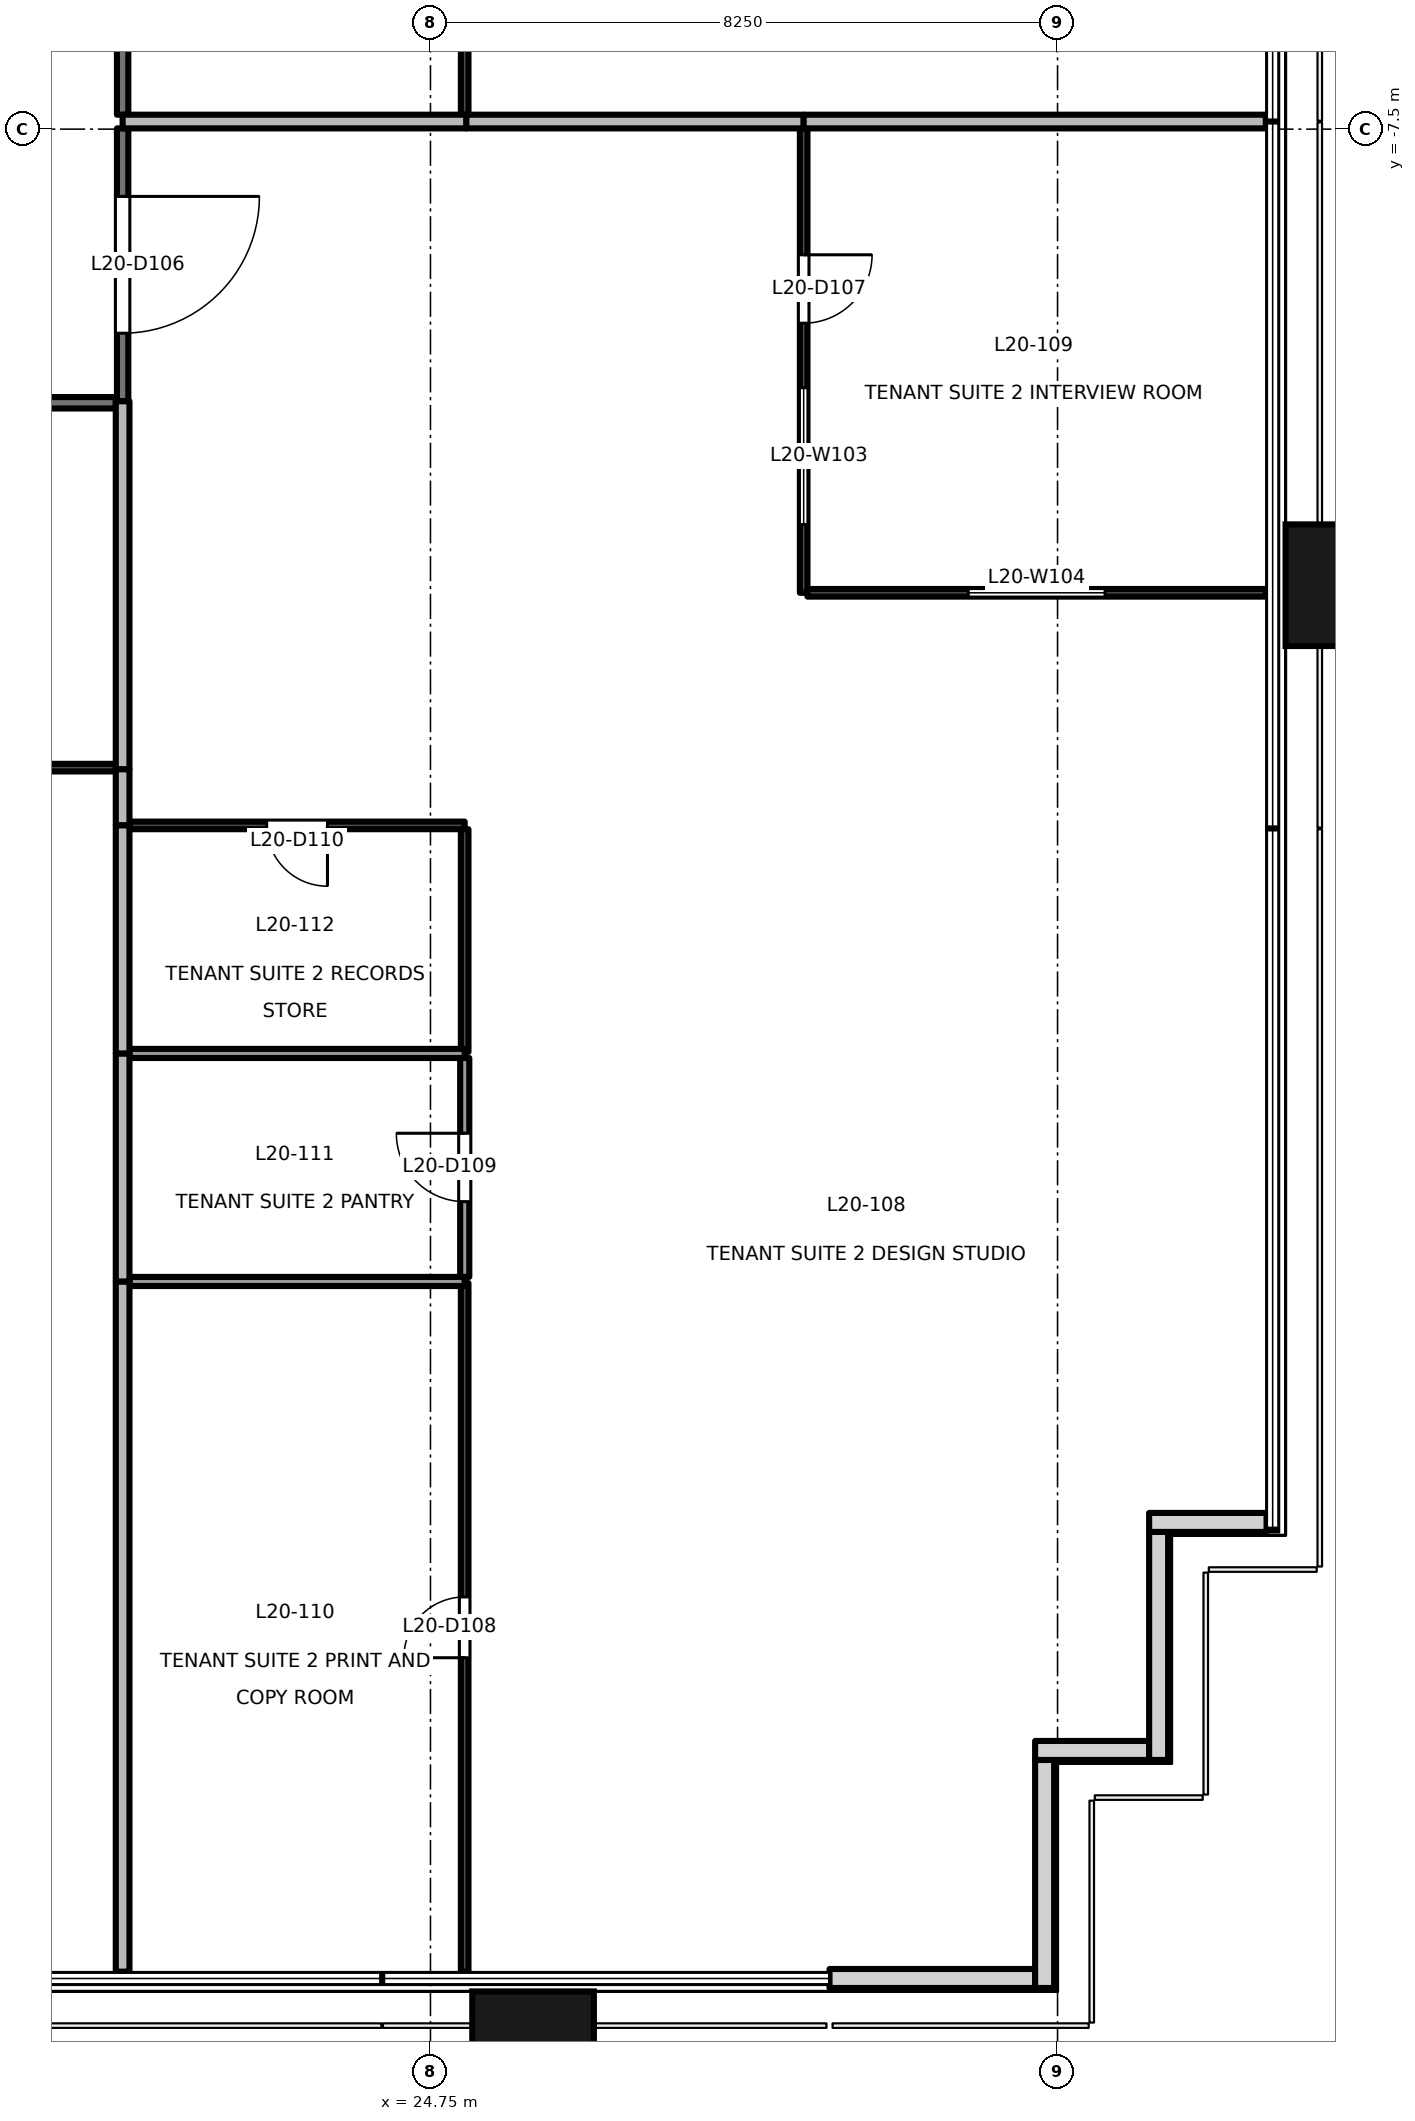
"""IFC4 building model, lengths in metres.
Left out: names, types, materials, properties, quantities, classifications, styles, units other than length and angle.
Written with IfcOpenShell. Run it as: python <this file> out.ifc"""

import sys

from ifc_helpers import new_model, si_unit, direction, frame, frame_2d, origin, origin_2d, place, context, subcontext, project, spatial, rectangle, extrude, element, fill, save


model = new_model("IFC4")
c1 = context("Model", 3, precision=1e-05, world=origin(), true_north=direction((0.0, 1.0)))
c2 = subcontext(c1, "Body", "Model", "MODEL_VIEW")
j1 = project(units=[si_unit("LENGTHUNIT", "METRE"), si_unit("PLANEANGLEUNIT", "RADIAN")], contexts=[c1])
p1 = place(None, origin())
s1 = spatial("IfcSite", under=j1, at=p1, CompositionType="ELEMENT")
p2 = place(p1, origin())
s2 = spatial("IfcBuilding", under=s1, at=p2, CompositionType="ELEMENT")
p3 = place(p2, frame((0.0, 0.0, 91.7)))
s3 = spatial("IfcBuildingStorey", under=s2, at=p3, CompositionType="ELEMENT", Elevation=91.7)
for number, where, z_axis, x_axis in (
    (1, (26.1, -32.9, -0.2), (0.0, 0.0, 1.0), (1.0, 0.0, 0.0)),
    (2, (36.9, -13.5, -0.2), (0.0, 0.0, 1.0), (0.0, 1.0, 0.0)),
):
    element("IfcColumn", number, at=place(p3, frame(where, z_axis=z_axis, x_axis=x_axis)), inside=s3, PredefinedType="COLUMN", context=c2, shape_type="SweptSolid", body=[
        extrude(rectangle(XDim=1.6, YDim=1.8, at=origin_2d()), origin(), (0.0, 0.0, 1.0), 4.0),
    ])
p4 = place(p3, frame((30.0, -31.83, 0.0), z_axis=(0.0, 0.0, 1.0), x_axis=(1.0, 0.0, 0.0)))
e3 = element("IfcWall", 3, at=p4, inside=s3, PredefinedType="SOLIDWALL", context=c2, shape_type="SweptSolid", body=[
    extrude(rectangle(XDim=2.705, YDim=0.25, at=frame_2d((1.353, 0.0))), origin(), (0.0, 0.0, 1.0), 3.8),
])
p5 = place(p3, frame((32.83, -31.955, 0.0), z_axis=(0.0, 0.0, 1.0), x_axis=(0.0, 1.0, 0.0)))
e4 = element("IfcWall", 4, at=p5, inside=s3, PredefinedType="SOLIDWALL", context=c2, shape_type="SweptSolid", body=[
    extrude(rectangle(XDim=3.0, YDim=0.25, at=frame_2d((1.5, 0.0))), origin(), (0.0, 0.0, 1.0), 3.8),
])
p6 = place(p3, frame((32.705, -28.83, 0.0), z_axis=(0.0, 0.0, 1.0), x_axis=(1.0, 0.0, 0.0)))
e5 = element("IfcWall", 5, at=p6, inside=s3, PredefinedType="SOLIDWALL", context=c2, shape_type="SweptSolid", body=[
    extrude(rectangle(XDim=1.5, YDim=0.25, at=frame_2d((0.75, 0.0))), origin(), (0.0, 0.0, 1.0), 3.8),
])
p7 = place(p3, frame((34.33, -28.955, 0.0), z_axis=(0.0, 0.0, 1.0), x_axis=(0.0, 1.0, 0.0)))
e6 = element("IfcWall", 6, at=p7, inside=s3, PredefinedType="SOLIDWALL", context=c2, shape_type="SweptSolid", body=[
    extrude(rectangle(XDim=3.0, YDim=0.25, at=frame_2d((1.5, 0.0))), origin(), (0.0, 0.0, 1.0), 3.8),
])
p8 = place(p3, frame((34.205, -25.83, 0.0), z_axis=(0.0, 0.0, 1.0), x_axis=(1.0, 0.0, 0.0)))
e7 = element("IfcWall", 7, at=p8, inside=s3, PredefinedType="SOLIDWALL", context=c2, shape_type="SweptSolid", body=[
    extrude(rectangle(XDim=1.545, YDim=0.25, at=frame_2d((0.772, 0.0))), origin(), (0.0, 0.0, 1.0), 3.8),
])
p9 = place(p3, frame((20.7, -7.49, 0.0), z_axis=(0.0, 0.0, 1.0), x_axis=(0.0, -1.0, 0.0)))
e8 = element("IfcWall", 8, at=p9, inside=s3, PredefinedType="PARTITIONING", context=c2, shape_type="SweptSolid", body=[
    extrude(rectangle(XDim=3.59, YDim=0.15, at=frame_2d((1.795, 0.0))), origin(), (0.0, 0.0, 1.0), 2.9),
])
p10 = place(p9, frame((0.895, 0.0, 0.0)))
e9 = element("IfcOpeningElement", 9, at=p10, cuts=e8, PredefinedType="OPENING", context=c2, shape_type="SweptSolid", body=[
    extrude(rectangle(XDim=1.8, YDim=2.1, at=frame_2d((0.9, 1.05))), frame((0.0, 0.085, 0.0), z_axis=(0.0, -1.0, 0.0), x_axis=(1.0, 0.0, 0.0)), (0.0, 0.0, 1.0), 0.171),
])
p11 = place(p3, frame((20.7, -3.82, 0.0), z_axis=(0.0, 0.0, 1.0), x_axis=(0.0, -1.0, 0.0)))
e10 = element("IfcWall", 10, at=p11, inside=s3, PredefinedType="PARTITIONING", context=c2, shape_type="SweptSolid", body=[
    extrude(rectangle(XDim=3.49, YDim=0.15, at=frame_2d((1.745, 0.0))), origin(), (0.0, 0.0, 1.0), 2.9),
])
p12 = place(p3, frame((20.61, -11.1, 0.0), z_axis=(0.0, 0.0, 1.0), x_axis=(-1.0, 0.0, 0.0)))
e11 = element("IfcWall", 11, at=p12, inside=s3, PredefinedType="PARTITIONING", context=c2, shape_type="SweptSolid", body=[
    extrude(rectangle(XDim=8.63, YDim=0.15, at=frame_2d((4.315, 0.0))), origin(), (0.0, 0.0, 1.0), 2.4),
])
p13 = place(p3, frame((29.66, -7.49, 0.0), z_axis=(0.0, 0.0, 1.0), x_axis=(0.0, -1.0, 0.0)))
e12 = element("IfcWall", 12, at=p13, inside=s3, PredefinedType="PARTITIONING", context=c2, shape_type="SweptSolid", body=[
    extrude(rectangle(XDim=6.11, YDim=0.1, at=frame_2d((3.055, 0.0))), origin(), (0.0, 0.0, 1.0), 2.9),
])
p14 = place(p13, frame((1.663, 0.0, 0.0)))
e13 = element("IfcOpeningElement", 13, at=p14, cuts=e12, PredefinedType="OPENING", context=c2, shape_type="SweptSolid", body=[
    extrude(rectangle(XDim=0.9, YDim=2.1, at=frame_2d((0.45, 1.05))), frame((0.0, 0.061, 0.0), z_axis=(0.0, -1.0, 0.0), x_axis=(1.0, 0.0, 0.0)), (0.0, 0.0, 1.0), 0.121),
])
p15 = place(p13, frame((3.412, 0.0, 0.9)))
e14 = element("IfcOpeningElement", 14, at=p15, cuts=e12, PredefinedType="OPENING", context=c2, shape_type="SweptSolid", body=[
    extrude(rectangle(XDim=1.8, YDim=1.2, at=frame_2d((0.9, 0.6))), frame((0.0, 0.061, 0.0), z_axis=(0.0, -1.0, 0.0), x_axis=(1.0, 0.0, 0.0)), (0.0, 0.0, 1.0), 0.121),
])
p16 = place(p3, frame((29.71, -13.6, 0.0), z_axis=(0.0, 0.0, 1.0), x_axis=(1.0, 0.0, 0.0)))
e15 = element("IfcWall", 15, at=p16, inside=s3, PredefinedType="PARTITIONING", context=c2, shape_type="SweptSolid", body=[
    extrude(rectangle(XDim=6.03, YDim=0.1, at=frame_2d((3.015, 0.0))), origin(), (0.0, 0.0, 1.0), 2.9),
])
p17 = place(p16, frame((2.115, 0.0, 0.9)))
e16 = element("IfcOpeningElement", 16, at=p17, cuts=e15, PredefinedType="OPENING", context=c2, shape_type="SweptSolid", body=[
    extrude(rectangle(XDim=1.8, YDim=1.2, at=frame_2d((0.9, 0.6))), frame((0.0, 0.061, 0.0), z_axis=(0.0, -1.0, 0.0), x_axis=(1.0, 0.0, 0.0)), (0.0, 0.0, 1.0), 0.121),
])
p18 = place(p3, frame((25.2, -31.74, 0.0), z_axis=(0.0, 0.0, 1.0), x_axis=(0.0, 1.0, 0.0)))
e17 = element("IfcWall", 17, at=p18, inside=s3, PredefinedType="PARTITIONING", context=c2, shape_type="SweptSolid", body=[
    extrude(rectangle(XDim=9.06, YDim=0.1, at=frame_2d((4.53, 0.0))), origin(), (0.0, 0.0, 1.0), 3.8),
])
p19 = place(p18, frame((4.13, 0.0, 0.0)))
e18 = element("IfcOpeningElement", 18, at=p19, cuts=e17, PredefinedType="OPENING", context=c2, shape_type="SweptSolid", body=[
    extrude(rectangle(XDim=0.8, YDim=2.1, at=frame_2d((0.4, 1.05))), frame((0.0, 0.061, 0.0), z_axis=(0.0, -1.0, 0.0), x_axis=(1.0, 0.0, 0.0)), (0.0, 0.0, 1.0), 0.121),
])
p20 = place(p3, frame((25.201, -22.6, 0.0), z_axis=(0.0, 0.0, 1.0), x_axis=(0.0, 1.0, 0.0)))
e19 = element("IfcWall", 19, at=p20, inside=s3, PredefinedType="PARTITIONING", context=c2, shape_type="SweptSolid", body=[
    extrude(rectangle(XDim=2.88, YDim=0.12, at=frame_2d((1.44, 0.0))), origin(), (0.0, 0.0, 1.0), 3.8),
])
p21 = place(p20, frame((0.99, 0.0, 0.0)))
e20 = element("IfcOpeningElement", 20, at=p21, cuts=e19, PredefinedType="OPENING", context=c2, shape_type="SweptSolid", body=[
    extrude(rectangle(XDim=0.9, YDim=2.1, at=frame_2d((0.45, 1.05))), frame((0.0, 0.071, 0.0), z_axis=(0.0, -1.0, 0.0), x_axis=(1.0, 0.0, 0.0)), (0.0, 0.0, 1.0), 0.141),
])
p22 = place(p3, frame((25.2, -16.66, 0.0), z_axis=(0.0, 0.0, 1.0), x_axis=(-1.0, 0.0, 0.0)))
e21 = element("IfcWall", 21, at=p22, inside=s3, PredefinedType="PARTITIONING", context=c2, shape_type="SweptSolid", body=[
    extrude(rectangle(XDim=4.41, YDim=0.1, at=frame_2d((2.205, 0.0))), origin(), (0.0, 0.0, 1.0), 3.8),
])
p23 = place(p22, frame((1.805, 0.0, 0.0)))
e22 = element("IfcOpeningElement", 22, at=p23, cuts=e21, PredefinedType="OPENING", context=c2, shape_type="SweptSolid", body=[
    extrude(rectangle(XDim=0.8, YDim=2.1, at=frame_2d((0.4, 1.05))), frame((0.0, 0.061, 0.0), z_axis=(0.0, -1.0, 0.0), x_axis=(1.0, 0.0, 0.0)), (0.0, 0.0, 1.0), 0.121),
])
p24 = place(p3, frame((25.2, -19.64, 0.0), z_axis=(0.0, 0.0, 1.0), x_axis=(0.0, 1.0, 0.0)))
e23 = element("IfcWall", 23, at=p24, inside=s3, PredefinedType="PARTITIONING", context=c2, shape_type="SweptSolid", body=[
    extrude(rectangle(XDim=2.93, YDim=0.1, at=frame_2d((1.465, 0.0))), origin(), (0.0, 0.0, 1.0), 3.8),
])
p25 = place(p3, frame((25.22, -7.4, 0.0), z_axis=(0.0, 0.0, 1.0), x_axis=(1.0, 0.0, 0.0)))
e24 = element("IfcWall", 24, at=p25, inside=s3, PredefinedType="PARTITIONING", context=c2, shape_type="SweptSolid", body=[
    extrude(rectangle(XDim=4.44, YDim=0.18, at=frame_2d((2.22, 0.0))), origin(), (0.0, 0.0, 1.0), 3.8),
])
p26 = place(p3, frame((20.7, -7.4, 0.0), z_axis=(0.0, 0.0, 1.0), x_axis=(1.0, 0.0, 0.0)))
e25 = element("IfcWall", 25, at=p26, inside=s3, PredefinedType="PARTITIONING", context=c2, shape_type="SweptSolid", body=[
    extrude(rectangle(XDim=4.52, YDim=0.18, at=frame_2d((2.26, 0.0))), origin(), (0.0, 0.0, 1.0), 3.8),
])
p27 = place(p3, frame((20.7, -16.66, 0.0), z_axis=(0.0, 0.0, 1.0), x_axis=(0.0, 1.0, 0.0)))
e26 = element("IfcWall", 26, at=p27, inside=s3, PredefinedType="PARTITIONING", context=c2, shape_type="SweptSolid", body=[
    extrude(rectangle(XDim=0.74, YDim=0.18, at=frame_2d((0.37, 0.0))), origin(), (0.0, 0.0, 1.0), 3.8),
])
p28 = place(p3, frame((20.7, -15.92, 0.0), z_axis=(0.0, 0.0, 1.0), x_axis=(0.0, 1.0, 0.0)))
e27 = element("IfcWall", 27, at=p28, inside=s3, PredefinedType="PARTITIONING", context=c2, shape_type="SweptSolid", body=[
    extrude(rectangle(XDim=4.84, YDim=0.18, at=frame_2d((2.42, 0.0))), origin(), (0.0, 0.0, 1.0), 2.9),
])
p29 = place(p3, frame((29.66, -7.4, 0.0), z_axis=(0.0, 0.0, 1.0), x_axis=(1.0, 0.0, 0.0)))
e28 = element("IfcWall", 28, at=p29, inside=s3, PredefinedType="PARTITIONING", context=c2, shape_type="SweptSolid", body=[
    extrude(rectangle(XDim=6.08, YDim=0.18, at=frame_2d((3.04, 0.0))), origin(), (0.0, 0.0, 1.0), 3.8),
])
p30 = place(p3, frame((20.79, -22.66, 0.0), z_axis=(0.0, 0.0, 1.0), x_axis=(1.0, 0.0, 0.0)))
e29 = element("IfcWall", 29, at=p30, inside=s3, PredefinedType="PARTITIONING", context=c2, shape_type="SweptSolid", body=[
    extrude(rectangle(XDim=4.41, YDim=0.12, at=frame_2d((2.205, 0.0))), origin(), (0.0, 0.0, 1.0), 3.8),
])
p31 = place(p3, frame((20.7, -31.74, 0.0), z_axis=(0.0, 0.0, 1.0), x_axis=(0.0, 1.0, 0.0)))
e30 = element("IfcWall", 30, at=p31, inside=s3, PredefinedType="PARTITIONING", context=c2, shape_type="SweptSolid", body=[
    extrude(rectangle(XDim=9.08, YDim=0.18, at=frame_2d((4.54, 0.0))), origin(), (0.0, 0.0, 1.0), 3.8),
])
p32 = place(p3, frame((20.79, -19.66, 0.0), z_axis=(0.0, 0.0, 1.0), x_axis=(1.0, 0.0, 0.0)))
e31 = element("IfcWall", 31, at=p32, inside=s3, PredefinedType="PARTITIONING", context=c2, shape_type="SweptSolid", body=[
    extrude(rectangle(XDim=4.41, YDim=0.12, at=frame_2d((2.205, 0.0))), origin(), (0.0, 0.0, 1.0), 3.8),
])
for number, where, z_axis, x_axis in (
    (32, (20.7, -22.66, 0.0), (0.0, 0.0, 1.0), (0.0, 1.0, 0.0)),
    (33, (20.7, -19.66, 0.0), (0.0, 0.0, 1.0), (0.0, 1.0, 0.0)),
):
    element("IfcWall", number, at=place(p3, frame(where, z_axis=z_axis, x_axis=x_axis)), inside=s3, PredefinedType="PARTITIONING", context=c2, shape_type="SweptSolid", body=[
        extrude(rectangle(XDim=3.0, YDim=0.18, at=frame_2d((1.5, 0.0))), origin(), (0.0, 0.0, 1.0), 3.8),
    ])
p33 = place(p3, frame((25.2, -7.31, 0.0), z_axis=(0.0, 0.0, 1.0), x_axis=(0.0, 1.0, 0.0)))
e34 = element("IfcWall", 34, at=p33, inside=s3, PredefinedType="PARTITIONING", context=c2, shape_type="SweptSolid", body=[
    extrude(rectangle(XDim=3.49, YDim=0.1, at=frame_2d((1.745, 0.0))), origin(), (0.0, 0.0, 1.0), 2.9),
])
p34 = place(p33, frame((0.877, 0.0, 0.0)))
e35 = element("IfcOpeningElement", 35, at=p34, cuts=e34, PredefinedType="OPENING", context=c2, shape_type="SweptSolid", body=[
    extrude(rectangle(XDim=0.9, YDim=2.1, at=frame_2d((0.45, 1.05))), frame((0.0, 0.061, 0.0), z_axis=(0.0, -1.0, 0.0), x_axis=(1.0, 0.0, 0.0)), (0.0, 0.0, 1.0), 0.121),
])
p35 = place(p3, frame((12.0, -15.9, 0.0), z_axis=(0.0, 0.0, 1.0), x_axis=(1.0, 0.0, 0.0)))
e36 = element("IfcWall", 36, at=p35, inside=s3, PredefinedType="PARTITIONING", context=c2, shape_type="SweptSolid", body=[
    extrude(rectangle(XDim=8.61, YDim=0.1, at=frame_2d((4.305, 0.0))), origin(), (0.0, 0.0, 1.0), 2.4),
])
p36 = place(p35, frame((5.367, 0.0, 0.0)))
e37 = element("IfcOpeningElement", 37, at=p36, cuts=e36, PredefinedType="OPENING", context=c2, shape_type="SweptSolid", body=[
    extrude(rectangle(XDim=0.8, YDim=2.1, at=frame_2d((0.4, 1.05))), frame((0.0, 0.061, 0.0), z_axis=(0.0, -1.0, 0.0), x_axis=(1.0, 0.0, 0.0)), (0.0, 0.0, 1.0), 0.121),
])
p37 = place(p10, origin())
e38 = element("IfcDoor", 38, at=p37, inside=s3, OperationType="DOUBLE_DOOR_SINGLE_SWING", PredefinedType="DOOR", context=c2, shape_type="SweptSolid", body=[
    extrude(rectangle(XDim=1.8, YDim=2.1, at=frame_2d((0.9, 1.05))), frame((0.0, 0.025, 0.0), z_axis=(0.0, -1.0, 0.0), x_axis=(1.0, 0.0, 0.0)), (0.0, 0.0, 1.0), 0.05),
])
fill(e9, e38)
p38 = place(p14, origin())
e39 = element("IfcDoor", 39, at=p38, inside=s3, OperationType="SINGLE_SWING_LEFT", PredefinedType="DOOR", context=c2, shape_type="SweptSolid", body=[
    extrude(rectangle(XDim=0.9, YDim=2.1, at=frame_2d((0.45, 1.05))), frame((0.0, 0.025, 0.0), z_axis=(0.0, -1.0, 0.0), x_axis=(1.0, 0.0, 0.0)), (0.0, 0.0, 1.0), 0.05),
])
fill(e13, e39)
p39 = place(p19, origin())
e40 = element("IfcDoor", 40, at=p39, inside=s3, OperationType="SINGLE_SWING_LEFT", PredefinedType="DOOR", context=c2, shape_type="SweptSolid", body=[
    extrude(rectangle(XDim=0.8, YDim=2.1, at=frame_2d((0.4, 1.05))), frame((0.0, 0.025, 0.0), z_axis=(0.0, -1.0, 0.0), x_axis=(1.0, 0.0, 0.0)), (0.0, 0.0, 1.0), 0.05),
])
fill(e18, e40)
p40 = place(p21, origin())
e41 = element("IfcDoor", 41, at=p40, inside=s3, OperationType="SINGLE_SWING_RIGHT", PredefinedType="DOOR", context=c2, shape_type="SweptSolid", body=[
    extrude(rectangle(XDim=0.9, YDim=2.1, at=frame_2d((0.45, 1.05))), frame((0.0, 0.025, 0.0), z_axis=(0.0, -1.0, 0.0), x_axis=(1.0, 0.0, 0.0)), (0.0, 0.0, 1.0), 0.05),
])
fill(e20, e41)
p41 = place(p23, origin())
e42 = element("IfcDoor", 42, at=p41, inside=s3, OperationType="SINGLE_SWING_LEFT", PredefinedType="DOOR", context=c2, shape_type="SweptSolid", body=[
    extrude(rectangle(XDim=0.8, YDim=2.1, at=frame_2d((0.4, 1.05))), frame((0.0, 0.025, 0.0), z_axis=(0.0, -1.0, 0.0), x_axis=(1.0, 0.0, 0.0)), (0.0, 0.0, 1.0), 0.05),
])
fill(e22, e42)
p42 = place(p15, origin())
e43 = element("IfcWindow", 43, at=p42, inside=s3, PartitioningType="SINGLE_PANEL", PredefinedType="WINDOW", context=c2, shape_type="SweptSolid", body=[
    extrude(rectangle(XDim=1.8, YDim=1.2, at=frame_2d((0.9, 0.6))), frame((0.0, 0.03, 0.0), z_axis=(0.0, -1.0, 0.0), x_axis=(1.0, 0.0, 0.0)), (0.0, 0.0, 1.0), 0.06),
])
fill(e14, e43)
p43 = place(p17, origin())
e44 = element("IfcWindow", 44, at=p43, inside=s3, PartitioningType="SINGLE_PANEL", PredefinedType="WINDOW", context=c2, shape_type="SweptSolid", body=[
    extrude(rectangle(XDim=1.8, YDim=1.2, at=frame_2d((0.9, 0.6))), frame((0.0, 0.03, 0.0), z_axis=(0.0, -1.0, 0.0), x_axis=(1.0, 0.0, 0.0)), (0.0, 0.0, 1.0), 0.06),
])
fill(e16, e44)
save(model, sys.argv[1])
